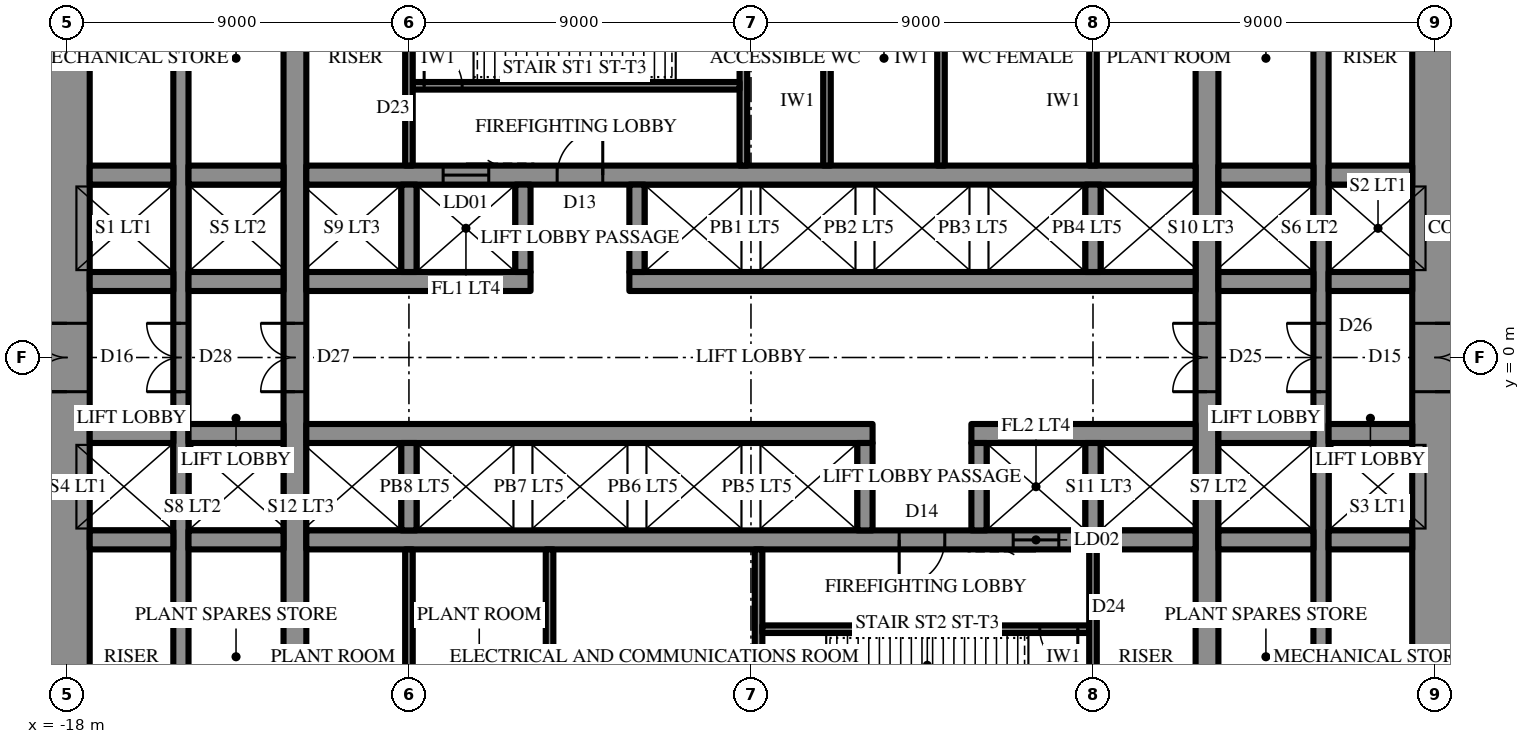
"""IFC4 building model, lengths in metres.
Left out: names, types, materials, properties, quantities, classifications, styles, units other than length and angle.
Written with IfcOpenShell. Run it as: python <this file> out.ifc"""

import sys

from ifc_helpers import new_model, si_unit, direction, frame, frame_2d, origin, place, context, subcontext, project, spatial, rectangle, extrude, element, fill, save


model = new_model("IFC4")
c1 = context("Model", 3, precision=1e-05, world=origin(), true_north=direction((0.0, 1.0)))
c2 = subcontext(c1, "Body", "Model", "MODEL_VIEW")
j1 = project(units=[si_unit("LENGTHUNIT", "METRE"), si_unit("PLANEANGLEUNIT", "RADIAN")], contexts=[c1])
p1 = place(None, origin())
s1 = spatial("IfcSite", under=j1, at=p1, CompositionType="ELEMENT")
p2 = place(p1, origin())
s2 = spatial("IfcBuilding", under=s1, at=p2, CompositionType="ELEMENT")
p3 = place(p2, frame((0.0, 0.0, 107.5)))
s3 = spatial("IfcBuildingStorey", under=s2, at=p3, CompositionType="ELEMENT", Elevation=107.5)
p4 = place(p3, frame((18.0, -10.7, 0.0), z_axis=(0.0, 0.0, 1.0), x_axis=(0.0, 1.0, 0.0)))
e1 = element("IfcWall", 1, at=p4, inside=s3, PredefinedType="SHEAR", context=c2, shape_type="SweptSolid", body=[
    extrude(rectangle(XDim=21.4, YDim=1.2, at=frame_2d((10.7, 0.0))), origin(), (0.0, 0.0, 1.0), 7.0),
])
p5 = place(p4, frame((9.8, 0.0, 0.0)))
e2 = element("IfcOpeningElement", 2, at=p5, cuts=e1, PredefinedType="OPENING", context=c2, shape_type="SweptSolid", body=[
    extrude(rectangle(XDim=1.8, YDim=2.4, at=frame_2d((0.9, 1.2))), frame((0.0, 0.61, 0.0), z_axis=(0.0, -1.0, 0.0), x_axis=(1.0, 0.0, 0.0)), (0.0, 0.0, 1.0), 1.22),
])
p6 = place(p3, frame((-18.0, 10.7, 0.0), z_axis=(0.0, 0.0, 1.0), x_axis=(0.0, -1.0, 0.0)))
e3 = element("IfcWall", 3, at=p6, inside=s3, PredefinedType="SHEAR", context=c2, shape_type="SweptSolid", body=[
    extrude(rectangle(XDim=21.4, YDim=1.2, at=frame_2d((10.7, 0.0))), origin(), (0.0, 0.0, 1.0), 7.0),
])
p7 = place(p6, frame((9.8, 0.0, 0.0)))
e4 = element("IfcOpeningElement", 4, at=p7, cuts=e3, PredefinedType="OPENING", context=c2, shape_type="SweptSolid", body=[
    extrude(rectangle(XDim=1.8, YDim=2.4, at=frame_2d((0.9, 1.2))), frame((0.0, 0.61, 0.0), z_axis=(0.0, -1.0, 0.0), x_axis=(1.0, 0.0, 0.0)), (0.0, 0.0, 1.0), 1.22),
])
p8 = place(p3, frame((12.0, -10.7, 0.0), z_axis=(0.0, 0.0, 1.0), x_axis=(0.0, 1.0, 0.0)))
e5 = element("IfcWall", 5, at=p8, inside=s3, PredefinedType="SHEAR", context=c2, shape_type="SweptSolid", body=[
    extrude(rectangle(XDim=21.4, YDim=0.6, at=frame_2d((10.7, 0.0))), origin(), (0.0, 0.0, 1.0), 7.0),
])
p9 = place(p8, frame((9.8, 0.0, 0.0)))
e6 = element("IfcOpeningElement", 6, at=p9, cuts=e5, PredefinedType="OPENING", context=c2, shape_type="SweptSolid", body=[
    extrude(rectangle(XDim=1.8, YDim=2.4, at=frame_2d((0.9, 1.2))), frame((0.0, 0.31, 0.0), z_axis=(0.0, -1.0, 0.0), x_axis=(1.0, 0.0, 0.0)), (0.0, 0.0, 1.0), 0.62),
])
p10 = place(p3, frame((-12.0, -10.7, 0.0), z_axis=(0.0, 0.0, 1.0), x_axis=(0.0, 1.0, 0.0)))
e7 = element("IfcWall", 7, at=p10, inside=s3, PredefinedType="SHEAR", context=c2, shape_type="SweptSolid", body=[
    extrude(rectangle(XDim=21.4, YDim=0.6, at=frame_2d((10.7, 0.0))), origin(), (0.0, 0.0, 1.0), 7.0),
])
p11 = place(p10, frame((9.8, 0.0, 0.0)))
e8 = element("IfcOpeningElement", 8, at=p11, cuts=e7, PredefinedType="OPENING", context=c2, shape_type="SweptSolid", body=[
    extrude(rectangle(XDim=1.8, YDim=2.4, at=frame_2d((0.9, 1.2))), frame((0.0, 0.31, 0.0), z_axis=(0.0, -1.0, 0.0), x_axis=(1.0, 0.0, 0.0)), (0.0, 0.0, 1.0), 0.62),
])
p12 = place(p3, frame((15.0, -10.7, 0.0), z_axis=(0.0, 0.0, 1.0), x_axis=(0.0, 1.0, 0.0)))
e9 = element("IfcWall", 9, at=p12, inside=s3, PredefinedType="SHEAR", context=c2, shape_type="SweptSolid", body=[
    extrude(rectangle(XDim=21.4, YDim=0.4, at=frame_2d((10.7, 0.0))), origin(), (0.0, 0.0, 1.0), 7.0),
])
p13 = place(p12, frame((9.8, 0.0, 0.0)))
e10 = element("IfcOpeningElement", 10, at=p13, cuts=e9, PredefinedType="OPENING", context=c2, shape_type="SweptSolid", body=[
    extrude(rectangle(XDim=1.8, YDim=2.4, at=frame_2d((0.9, 1.2))), frame((0.0, 0.21, 0.0), z_axis=(0.0, -1.0, 0.0), x_axis=(1.0, 0.0, 0.0)), (0.0, 0.0, 1.0), 0.42),
])
p14 = place(p3, frame((-15.0, -10.7, 0.0), z_axis=(0.0, 0.0, 1.0), x_axis=(0.0, 1.0, 0.0)))
e11 = element("IfcWall", 11, at=p14, inside=s3, PredefinedType="SHEAR", context=c2, shape_type="SweptSolid", body=[
    extrude(rectangle(XDim=21.4, YDim=0.4, at=frame_2d((10.7, 0.0))), origin(), (0.0, 0.0, 1.0), 7.0),
])
p15 = place(p14, frame((9.8, 0.0, 0.0)))
e12 = element("IfcOpeningElement", 12, at=p15, cuts=e11, PredefinedType="OPENING", context=c2, shape_type="SweptSolid", body=[
    extrude(rectangle(XDim=1.8, YDim=2.4, at=frame_2d((0.9, 1.2))), frame((0.0, 0.21, 0.0), z_axis=(0.0, -1.0, 0.0), x_axis=(1.0, 0.0, 0.0)), (0.0, 0.0, 1.0), 0.42),
])
p16 = place(p3, frame((-17.4, 2.0, 0.0), z_axis=(0.0, 0.0, 1.0), x_axis=(1.0, 0.0, 0.0)))
e13 = element("IfcWall", 13, at=p16, inside=s3, PredefinedType="SHEAR", context=c2, shape_type="SweptSolid", body=[
    extrude(rectangle(XDim=2.2, YDim=0.5, at=frame_2d((1.1, 0.0))), origin(), (0.0, 0.0, 1.0), 7.0),
])
p17 = place(p3, frame((-14.8, 2.0, 0.0), z_axis=(0.0, 0.0, 1.0), x_axis=(1.0, 0.0, 0.0)))
e14 = element("IfcWall", 14, at=p17, inside=s3, PredefinedType="SHEAR", context=c2, shape_type="SweptSolid", body=[
    extrude(rectangle(XDim=2.5, YDim=0.5, at=frame_2d((1.25, 0.0))), origin(), (0.0, 0.0, 1.0), 7.0),
])
p18 = place(p3, frame((-11.7, 2.0, 0.0), z_axis=(0.0, 0.0, 1.0), x_axis=(1.0, 0.0, 0.0)))
e15 = element("IfcWall", 15, at=p18, inside=s3, PredefinedType="SHEAR", context=c2, shape_type="SweptSolid", body=[
    extrude(rectangle(XDim=5.9, YDim=0.5, at=frame_2d((2.95, 0.0))), origin(), (0.0, 0.0, 1.0), 7.0),
])
p19 = place(p3, frame((-3.2, 2.0, 0.0), z_axis=(0.0, 0.0, 1.0), x_axis=(1.0, 0.0, 0.0)))
e16 = element("IfcWall", 16, at=p19, inside=s3, PredefinedType="SHEAR", context=c2, shape_type="SweptSolid", body=[
    extrude(rectangle(XDim=14.9, YDim=0.5, at=frame_2d((7.45, 0.0))), origin(), (0.0, 0.0, 1.0), 7.0),
])
p20 = place(p3, frame((12.3, 2.0, 0.0), z_axis=(0.0, 0.0, 1.0), x_axis=(1.0, 0.0, 0.0)))
e17 = element("IfcWall", 17, at=p20, inside=s3, PredefinedType="SHEAR", context=c2, shape_type="SweptSolid", body=[
    extrude(rectangle(XDim=2.5, YDim=0.5, at=frame_2d((1.25, 0.0))), origin(), (0.0, 0.0, 1.0), 7.0),
])
for number, where, z_axis, x_axis in (
    (18, (15.2, 2.0, 0.0), (0.0, 0.0, 1.0), (1.0, 0.0, 0.0)),
    (19, (-17.4, 4.8, 0.0), (0.0, 0.0, 1.0), (1.0, 0.0, 0.0)),
):
    element("IfcWall", number, at=place(p3, frame(where, z_axis=z_axis, x_axis=x_axis)), inside=s3, PredefinedType="SHEAR", context=c2, shape_type="SweptSolid", body=[
        extrude(rectangle(XDim=2.2, YDim=0.5, at=frame_2d((1.1, 0.0))), origin(), (0.0, 0.0, 1.0), 7.0),
    ])
p21 = place(p3, frame((-14.8, 4.8, 0.0), z_axis=(0.0, 0.0, 1.0), x_axis=(1.0, 0.0, 0.0)))
e20 = element("IfcWall", 20, at=p21, inside=s3, PredefinedType="SHEAR", context=c2, shape_type="SweptSolid", body=[
    extrude(rectangle(XDim=2.5, YDim=0.5, at=frame_2d((1.25, 0.0))), origin(), (0.0, 0.0, 1.0), 7.0),
])
p22 = place(p3, frame((-11.7, 4.8, 0.0), z_axis=(0.0, 0.0, 1.0), x_axis=(1.0, 0.0, 0.0)))
e21 = element("IfcWall", 21, at=p22, inside=s3, PredefinedType="SHEAR", context=c2, shape_type="SweptSolid", body=[
    extrude(rectangle(XDim=23.4, YDim=0.5, at=frame_2d((11.7, 0.0))), origin(), (0.0, 0.0, 1.0), 7.0),
])
p23 = place(p22, frame((6.6, 0.0, 0.0)))
e22 = element("IfcOpeningElement", 22, at=p23, cuts=e21, PredefinedType="OPENING", context=c2, shape_type="SweptSolid", body=[
    extrude(rectangle(XDim=1.2, YDim=2.2, at=frame_2d((0.6, 1.1))), frame((0.0, 0.26, 0.0), z_axis=(0.0, -1.0, 0.0), x_axis=(1.0, 0.0, 0.0)), (0.0, 0.0, 1.0), 0.52),
])
p24 = place(p22, frame((3.6, 0.0, 0.0)))
e23 = element("IfcOpeningElement", 23, at=p24, cuts=e21, PredefinedType="OPENING", context=c2, shape_type="SweptSolid", body=[
    extrude(rectangle(XDim=1.2, YDim=2.2, at=frame_2d((0.6, 1.1))), frame((0.0, 0.26, 0.0), z_axis=(0.0, -1.0, 0.0), x_axis=(1.0, 0.0, 0.0)), (0.0, 0.0, 1.0), 0.52),
])
p25 = place(p3, frame((12.3, 4.8, 0.0), z_axis=(0.0, 0.0, 1.0), x_axis=(1.0, 0.0, 0.0)))
e24 = element("IfcWall", 24, at=p25, inside=s3, PredefinedType="SHEAR", context=c2, shape_type="SweptSolid", body=[
    extrude(rectangle(XDim=2.5, YDim=0.5, at=frame_2d((1.25, 0.0))), origin(), (0.0, 0.0, 1.0), 7.0),
])
p26 = place(p3, frame((15.2, 4.8, 0.0), z_axis=(0.0, 0.0, 1.0), x_axis=(1.0, 0.0, 0.0)))
e25 = element("IfcWall", 25, at=p26, inside=s3, PredefinedType="SHEAR", context=c2, shape_type="SweptSolid", body=[
    extrude(rectangle(XDim=2.2, YDim=0.5, at=frame_2d((1.1, 0.0))), origin(), (0.0, 0.0, 1.0), 7.0),
])
for number, where, z_axis, x_axis in (
    (26, (-9.0, 2.25, 0.0), (0.0, 0.0, 1.0), (0.0, 1.0, 0.0)),
    (27, (-6.0, 2.25, 0.0), (0.0, 0.0, 1.0), (0.0, 1.0, 0.0)),
    (28, (-3.0, 2.25, 0.0), (0.0, 0.0, 1.0), (0.0, 1.0, 0.0)),
    (29, (9.0, 2.25, 0.0), (0.0, 0.0, 1.0), (0.0, 1.0, 0.0)),
):
    element("IfcWall", number, at=place(p3, frame(where, z_axis=z_axis, x_axis=x_axis)), inside=s3, PredefinedType="SHEAR", context=c2, shape_type="SweptSolid", body=[
        extrude(rectangle(XDim=2.3, YDim=0.4, at=frame_2d((1.15, 0.0))), origin(), (0.0, 0.0, 1.0), 7.0),
    ])
p27 = place(p3, frame((-0.2, 5.05, 0.0), z_axis=(0.0, 0.0, 1.0), x_axis=(0.0, 1.0, 0.0)))
e30 = element("IfcWall", 30, at=p27, inside=s3, PredefinedType="SHEAR", context=c2, shape_type="SweptSolid", body=[
    extrude(rectangle(XDim=5.65, YDim=0.2, at=frame_2d((2.825, 0.0))), origin(), (0.0, 0.0, 1.0), 7.0),
])
p28 = place(p3, frame((-8.9, 7.15, 0.0), z_axis=(0.0, 0.0, 1.0), x_axis=(1.0, 0.0, 0.0)))
e31 = element("IfcWall", 31, at=p28, inside=s3, PredefinedType="SHEAR", context=c2, shape_type="SweptSolid", body=[
    extrude(rectangle(XDim=8.6, YDim=0.2, at=frame_2d((4.3, 0.0))), origin(), (0.0, 0.0, 1.0), 7.0),
])
p29 = place(p28, frame((0.3, 0.0, 0.0)))
e32 = element("IfcOpeningElement", 32, at=p29, cuts=e31, PredefinedType="OPENING", context=c2, shape_type="SweptSolid", body=[
    extrude(rectangle(XDim=1.0, YDim=2.2, at=frame_2d((0.5, 1.1))), frame((0.0, 0.11, 0.0), z_axis=(0.0, -1.0, 0.0), x_axis=(1.0, 0.0, 0.0)), (0.0, 0.0, 1.0), 0.22),
])
p30 = place(p3, frame((17.4, -2.0, 0.0), z_axis=(0.0, 0.0, 1.0), x_axis=(-1.0, 0.0, 0.0)))
e33 = element("IfcWall", 33, at=p30, inside=s3, PredefinedType="SHEAR", context=c2, shape_type="SweptSolid", body=[
    extrude(rectangle(XDim=2.2, YDim=0.5, at=frame_2d((1.1, 0.0))), origin(), (0.0, 0.0, 1.0), 7.0),
])
p31 = place(p3, frame((14.8, -2.0, 0.0), z_axis=(0.0, 0.0, 1.0), x_axis=(-1.0, 0.0, 0.0)))
e34 = element("IfcWall", 34, at=p31, inside=s3, PredefinedType="SHEAR", context=c2, shape_type="SweptSolid", body=[
    extrude(rectangle(XDim=2.5, YDim=0.5, at=frame_2d((1.25, 0.0))), origin(), (0.0, 0.0, 1.0), 7.0),
])
p32 = place(p3, frame((11.7, -2.0, 0.0), z_axis=(0.0, 0.0, 1.0), x_axis=(-1.0, 0.0, 0.0)))
e35 = element("IfcWall", 35, at=p32, inside=s3, PredefinedType="SHEAR", context=c2, shape_type="SweptSolid", body=[
    extrude(rectangle(XDim=5.9, YDim=0.5, at=frame_2d((2.95, 0.0))), origin(), (0.0, 0.0, 1.0), 7.0),
])
p33 = place(p3, frame((3.2, -2.0, 0.0), z_axis=(0.0, 0.0, 1.0), x_axis=(-1.0, 0.0, 0.0)))
e36 = element("IfcWall", 36, at=p33, inside=s3, PredefinedType="SHEAR", context=c2, shape_type="SweptSolid", body=[
    extrude(rectangle(XDim=14.9, YDim=0.5, at=frame_2d((7.45, 0.0))), origin(), (0.0, 0.0, 1.0), 7.0),
])
p34 = place(p3, frame((-12.3, -2.0, 0.0), z_axis=(0.0, 0.0, 1.0), x_axis=(-1.0, 0.0, 0.0)))
e37 = element("IfcWall", 37, at=p34, inside=s3, PredefinedType="SHEAR", context=c2, shape_type="SweptSolid", body=[
    extrude(rectangle(XDim=2.5, YDim=0.5, at=frame_2d((1.25, 0.0))), origin(), (0.0, 0.0, 1.0), 7.0),
])
for number, where, z_axis, x_axis in (
    (38, (-15.2, -2.0, 0.0), (0.0, 0.0, 1.0), (-1.0, 0.0, 0.0)),
    (39, (17.4, -4.8, 0.0), (0.0, 0.0, 1.0), (-1.0, 0.0, 0.0)),
):
    element("IfcWall", number, at=place(p3, frame(where, z_axis=z_axis, x_axis=x_axis)), inside=s3, PredefinedType="SHEAR", context=c2, shape_type="SweptSolid", body=[
        extrude(rectangle(XDim=2.2, YDim=0.5, at=frame_2d((1.1, 0.0))), origin(), (0.0, 0.0, 1.0), 7.0),
    ])
p35 = place(p3, frame((14.8, -4.8, 0.0), z_axis=(0.0, 0.0, 1.0), x_axis=(-1.0, 0.0, 0.0)))
e40 = element("IfcWall", 40, at=p35, inside=s3, PredefinedType="SHEAR", context=c2, shape_type="SweptSolid", body=[
    extrude(rectangle(XDim=2.5, YDim=0.5, at=frame_2d((1.25, 0.0))), origin(), (0.0, 0.0, 1.0), 7.0),
])
p36 = place(p3, frame((11.7, -4.8, 0.0), z_axis=(0.0, 0.0, 1.0), x_axis=(-1.0, 0.0, 0.0)))
e41 = element("IfcWall", 41, at=p36, inside=s3, PredefinedType="SHEAR", context=c2, shape_type="SweptSolid", body=[
    extrude(rectangle(XDim=23.4, YDim=0.5, at=frame_2d((11.7, 0.0))), origin(), (0.0, 0.0, 1.0), 7.0),
])
p37 = place(p36, frame((6.6, 0.0, 0.0)))
e42 = element("IfcOpeningElement", 42, at=p37, cuts=e41, PredefinedType="OPENING", context=c2, shape_type="SweptSolid", body=[
    extrude(rectangle(XDim=1.2, YDim=2.2, at=frame_2d((0.6, 1.1))), frame((0.0, 0.26, 0.0), z_axis=(0.0, -1.0, 0.0), x_axis=(1.0, 0.0, 0.0)), (0.0, 0.0, 1.0), 0.52),
])
p38 = place(p36, frame((3.6, 0.0, 0.0)))
e43 = element("IfcOpeningElement", 43, at=p38, cuts=e41, PredefinedType="OPENING", context=c2, shape_type="SweptSolid", body=[
    extrude(rectangle(XDim=1.2, YDim=2.2, at=frame_2d((0.6, 1.1))), frame((0.0, 0.26, 0.0), z_axis=(0.0, -1.0, 0.0), x_axis=(1.0, 0.0, 0.0)), (0.0, 0.0, 1.0), 0.52),
])
p39 = place(p3, frame((-12.3, -4.8, 0.0), z_axis=(0.0, 0.0, 1.0), x_axis=(-1.0, 0.0, 0.0)))
e44 = element("IfcWall", 44, at=p39, inside=s3, PredefinedType="SHEAR", context=c2, shape_type="SweptSolid", body=[
    extrude(rectangle(XDim=2.5, YDim=0.5, at=frame_2d((1.25, 0.0))), origin(), (0.0, 0.0, 1.0), 7.0),
])
p40 = place(p3, frame((-15.2, -4.8, 0.0), z_axis=(0.0, 0.0, 1.0), x_axis=(-1.0, 0.0, 0.0)))
e45 = element("IfcWall", 45, at=p40, inside=s3, PredefinedType="SHEAR", context=c2, shape_type="SweptSolid", body=[
    extrude(rectangle(XDim=2.2, YDim=0.5, at=frame_2d((1.1, 0.0))), origin(), (0.0, 0.0, 1.0), 7.0),
])
for number, where, z_axis, x_axis in (
    (46, (9.0, -2.25, 0.0), (0.0, 0.0, 1.0), (0.0, -1.0, 0.0)),
    (47, (6.0, -2.25, 0.0), (0.0, 0.0, 1.0), (0.0, -1.0, 0.0)),
    (48, (3.0, -2.25, 0.0), (0.0, 0.0, 1.0), (0.0, -1.0, 0.0)),
    (49, (-9.0, -2.25, 0.0), (0.0, 0.0, 1.0), (0.0, -1.0, 0.0)),
):
    element("IfcWall", number, at=place(p3, frame(where, z_axis=z_axis, x_axis=x_axis)), inside=s3, PredefinedType="SHEAR", context=c2, shape_type="SweptSolid", body=[
        extrude(rectangle(XDim=2.3, YDim=0.4, at=frame_2d((1.15, 0.0))), origin(), (0.0, 0.0, 1.0), 7.0),
    ])
p41 = place(p3, frame((0.2, -5.05, 0.0), z_axis=(0.0, 0.0, 1.0), x_axis=(0.0, -1.0, 0.0)))
e50 = element("IfcWall", 50, at=p41, inside=s3, PredefinedType="SHEAR", context=c2, shape_type="SweptSolid", body=[
    extrude(rectangle(XDim=5.65, YDim=0.2, at=frame_2d((2.825, 0.0))), origin(), (0.0, 0.0, 1.0), 7.0),
])
p42 = place(p3, frame((8.9, -7.15, 0.0), z_axis=(0.0, 0.0, 1.0), x_axis=(-1.0, 0.0, 0.0)))
e51 = element("IfcWall", 51, at=p42, inside=s3, PredefinedType="SHEAR", context=c2, shape_type="SweptSolid", body=[
    extrude(rectangle(XDim=8.6, YDim=0.2, at=frame_2d((4.3, 0.0))), origin(), (0.0, 0.0, 1.0), 7.0),
])
p43 = place(p42, frame((0.3, 0.0, 0.0)))
e52 = element("IfcOpeningElement", 52, at=p43, cuts=e51, PredefinedType="OPENING", context=c2, shape_type="SweptSolid", body=[
    extrude(rectangle(XDim=1.0, YDim=2.2, at=frame_2d((0.5, 1.1))), frame((0.0, 0.11, 0.0), z_axis=(0.0, -1.0, 0.0), x_axis=(1.0, 0.0, 0.0)), (0.0, 0.0, 1.0), 0.22),
])
for number, where, z_axis, x_axis in (
    (53, (-9.0, 5.05, 0.0), (0.0, 0.0, 1.0), (0.0, 1.0, 0.0)),
    (54, (9.0, 5.05, 0.0), (0.0, 0.0, 1.0), (0.0, 1.0, 0.0)),
    (55, (2.0, 5.05, 0.0), (0.0, 0.0, 1.0), (0.0, 1.0, 0.0)),
    (56, (5.0, 5.05, 0.0), (0.0, 0.0, 1.0), (0.0, 1.0, 0.0)),
    (57, (9.0, -5.05, 0.0), (0.0, 0.0, 1.0), (0.0, -1.0, 0.0)),
    (58, (-9.0, -5.05, 0.0), (0.0, 0.0, 1.0), (0.0, -1.0, 0.0)),
    (59, (-5.3, -5.05, 0.0), (0.0, 0.0, 1.0), (0.0, -1.0, 0.0)),
):
    element("IfcWall", number, at=place(p3, frame(where, z_axis=z_axis, x_axis=x_axis)), inside=s3, PredefinedType="PARTITIONING", context=c2, shape_type="SweptSolid", body=[
        extrude(rectangle(XDim=5.65, YDim=0.2, at=frame_2d((2.825, 0.0))), origin(), (0.0, 0.0, 1.0), 6.7),
    ])
p44 = place(p5, frame((1.8, 0.0, 0.0), z_axis=(0.0, 0.0, 1.0), x_axis=(-1.0, 0.0, 0.0)))
e60 = element("IfcDoor", 60, at=p44, inside=s3, OperationType="DOUBLE_DOOR_SINGLE_SWING", PredefinedType="DOOR", context=c2, shape_type="SweptSolid", body=[
    extrude(rectangle(XDim=1.8, YDim=2.4, at=frame_2d((0.9, 1.2))), frame((0.0, 0.025, 0.0), z_axis=(0.0, -1.0, 0.0), x_axis=(1.0, 0.0, 0.0)), (0.0, 0.0, 1.0), 0.05),
])
fill(e2, e60)
p45 = place(p7, frame((1.8, 0.0, 0.0), z_axis=(0.0, 0.0, 1.0), x_axis=(-1.0, 0.0, 0.0)))
e61 = element("IfcDoor", 61, at=p45, inside=s3, OperationType="DOUBLE_DOOR_SINGLE_SWING", PredefinedType="DOOR", context=c2, shape_type="SweptSolid", body=[
    extrude(rectangle(XDim=1.8, YDim=2.4, at=frame_2d((0.9, 1.2))), frame((0.0, 0.025, 0.0), z_axis=(0.0, -1.0, 0.0), x_axis=(1.0, 0.0, 0.0)), (0.0, 0.0, 1.0), 0.05),
])
fill(e4, e61)
p46 = place(p23, origin())
e62 = element("IfcDoor", 62, at=p46, inside=s3, OperationType="SINGLE_SWING_LEFT", PredefinedType="DOOR", context=c2, shape_type="SweptSolid", body=[
    extrude(rectangle(XDim=1.2, YDim=2.2, at=frame_2d((0.6, 1.1))), frame((0.0, 0.025, 0.0), z_axis=(0.0, -1.0, 0.0), x_axis=(1.0, 0.0, 0.0)), (0.0, 0.0, 1.0), 0.05),
])
fill(e22, e62)
p47 = place(p29, origin())
e63 = element("IfcDoor", 63, at=p47, inside=s3, OperationType="SINGLE_SWING_RIGHT", PredefinedType="DOOR", context=c2, shape_type="SweptSolid", body=[
    extrude(rectangle(XDim=1.0, YDim=2.2, at=frame_2d((0.5, 1.1))), frame((0.0, 0.025, 0.0), z_axis=(0.0, -1.0, 0.0), x_axis=(1.0, 0.0, 0.0)), (0.0, 0.0, 1.0), 0.05),
])
fill(e32, e63)
p48 = place(p37, origin())
e64 = element("IfcDoor", 64, at=p48, inside=s3, OperationType="SINGLE_SWING_LEFT", PredefinedType="DOOR", context=c2, shape_type="SweptSolid", body=[
    extrude(rectangle(XDim=1.2, YDim=2.2, at=frame_2d((0.6, 1.1))), frame((0.0, 0.025, 0.0), z_axis=(0.0, -1.0, 0.0), x_axis=(1.0, 0.0, 0.0)), (0.0, 0.0, 1.0), 0.05),
])
fill(e42, e64)
p49 = place(p43, origin())
e65 = element("IfcDoor", 65, at=p49, inside=s3, OperationType="SINGLE_SWING_RIGHT", PredefinedType="DOOR", context=c2, shape_type="SweptSolid", body=[
    extrude(rectangle(XDim=1.0, YDim=2.2, at=frame_2d((0.5, 1.1))), frame((0.0, 0.025, 0.0), z_axis=(0.0, -1.0, 0.0), x_axis=(1.0, 0.0, 0.0)), (0.0, 0.0, 1.0), 0.05),
])
fill(e52, e65)
p50 = place(p9, origin())
e66 = element("IfcDoor", 66, at=p50, inside=s3, OperationType="DOUBLE_DOOR_SINGLE_SWING", PredefinedType="DOOR", context=c2, shape_type="SweptSolid", body=[
    extrude(rectangle(XDim=1.8, YDim=2.4, at=frame_2d((0.9, 1.2))), frame((0.0, 0.025, 0.0), z_axis=(0.0, -1.0, 0.0), x_axis=(1.0, 0.0, 0.0)), (0.0, 0.0, 1.0), 0.05),
])
fill(e6, e66)
p51 = place(p11, origin())
e67 = element("IfcDoor", 67, at=p51, inside=s3, OperationType="DOUBLE_DOOR_SINGLE_SWING", PredefinedType="DOOR", context=c2, shape_type="SweptSolid", body=[
    extrude(rectangle(XDim=1.8, YDim=2.4, at=frame_2d((0.9, 1.2))), frame((0.0, 0.025, 0.0), z_axis=(0.0, -1.0, 0.0), x_axis=(1.0, 0.0, 0.0)), (0.0, 0.0, 1.0), 0.05),
])
fill(e8, e67)
p52 = place(p13, origin())
e68 = element("IfcDoor", 68, at=p52, inside=s3, OperationType="DOUBLE_DOOR_SINGLE_SWING", PredefinedType="DOOR", context=c2, shape_type="SweptSolid", body=[
    extrude(rectangle(XDim=1.8, YDim=2.4, at=frame_2d((0.9, 1.2))), frame((0.0, 0.025, 0.0), z_axis=(0.0, -1.0, 0.0), x_axis=(1.0, 0.0, 0.0)), (0.0, 0.0, 1.0), 0.05),
])
fill(e10, e68)
p53 = place(p15, origin())
e69 = element("IfcDoor", 69, at=p53, inside=s3, OperationType="DOUBLE_DOOR_SINGLE_SWING", PredefinedType="DOOR", context=c2, shape_type="SweptSolid", body=[
    extrude(rectangle(XDim=1.8, YDim=2.4, at=frame_2d((0.9, 1.2))), frame((0.0, 0.025, 0.0), z_axis=(0.0, -1.0, 0.0), x_axis=(1.0, 0.0, 0.0)), (0.0, 0.0, 1.0), 0.05),
])
fill(e12, e69)
p54 = place(p24, origin())
e70 = element("IfcDoor", 70, at=p54, inside=s3, OperationType="SLIDING_TO_LEFT", PredefinedType="DOOR", context=c2, shape_type="SweptSolid", body=[
    extrude(rectangle(XDim=1.2, YDim=2.2, at=frame_2d((0.6, 1.1))), frame((0.0, 0.025, 0.0), z_axis=(0.0, -1.0, 0.0), x_axis=(1.0, 0.0, 0.0)), (0.0, 0.0, 1.0), 0.05),
])
fill(e23, e70)
p55 = place(p38, origin())
e71 = element("IfcDoor", 71, at=p55, inside=s3, OperationType="SLIDING_TO_LEFT", PredefinedType="DOOR", context=c2, shape_type="SweptSolid", body=[
    extrude(rectangle(XDim=1.2, YDim=2.2, at=frame_2d((0.6, 1.1))), frame((0.0, 0.025, 0.0), z_axis=(0.0, -1.0, 0.0), x_axis=(1.0, 0.0, 0.0)), (0.0, 0.0, 1.0), 0.05),
])
fill(e43, e71)
save(model, sys.argv[1])
